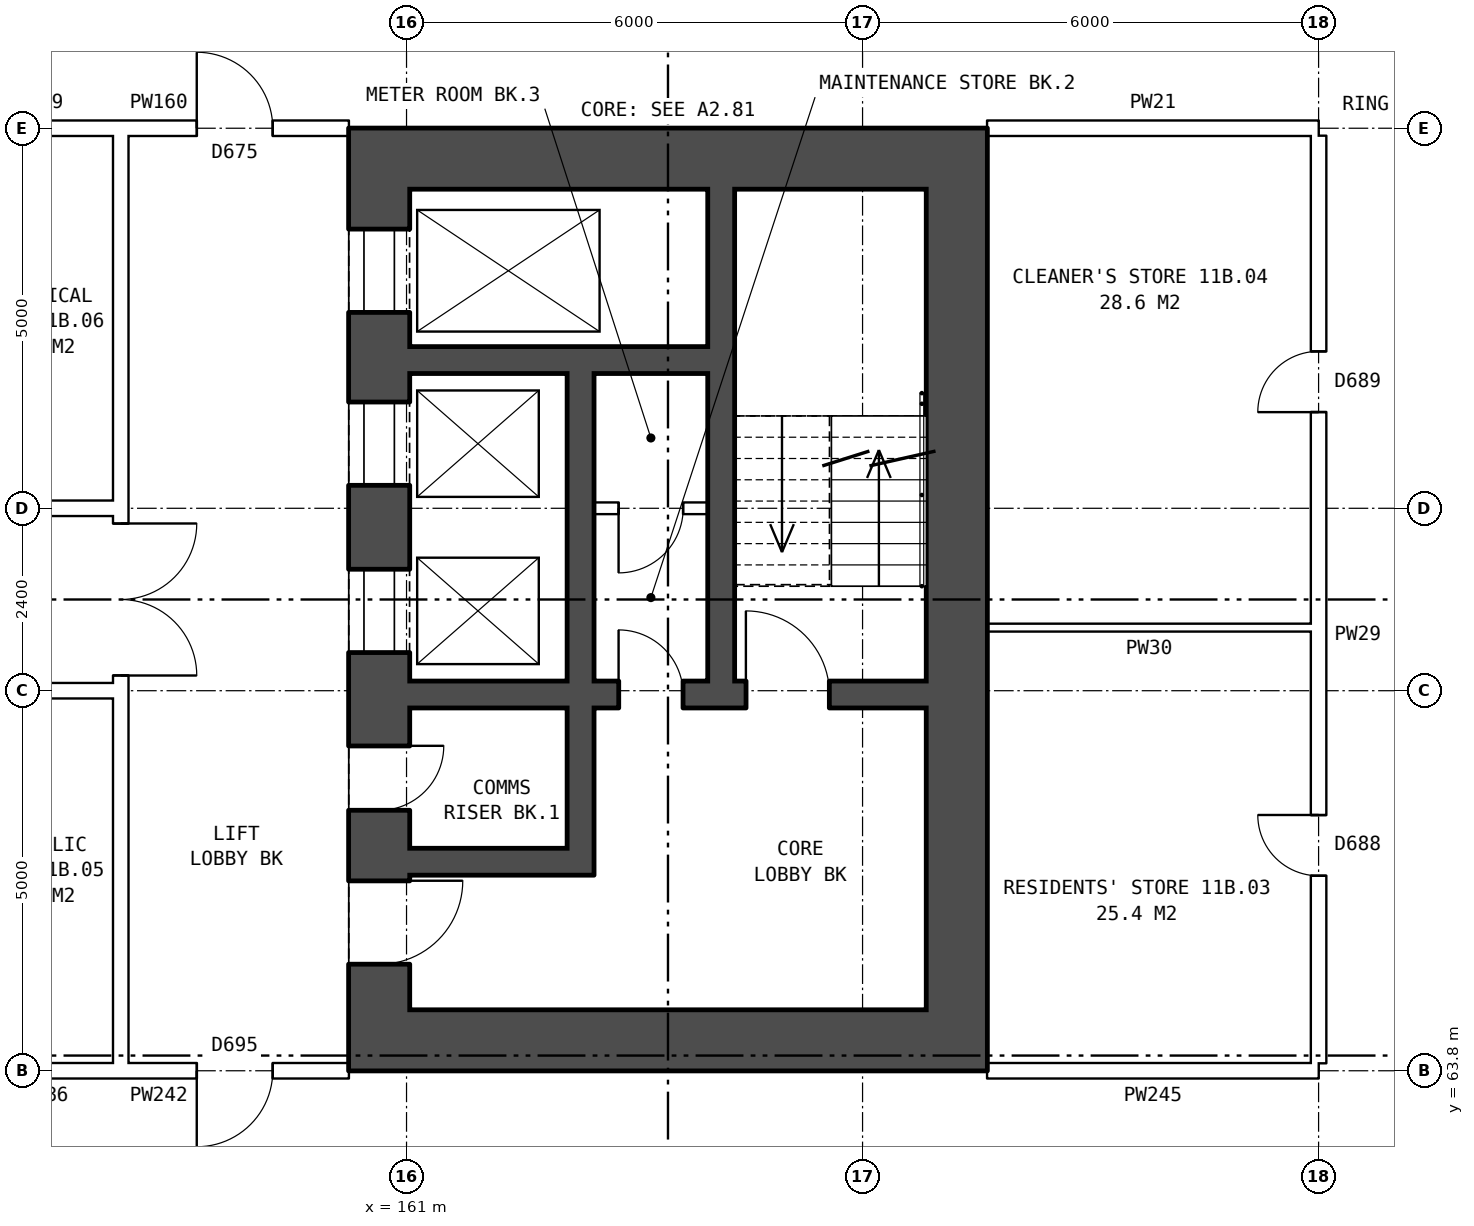
"""IFC4 building model, lengths in metres.
Left out: names, types, materials, properties, quantities, classifications, styles, units other than length and angle.
Written with IfcOpenShell. Run it as: python <this file> out.ifc"""

import sys

from ifc_helpers import new_model, si_unit, direction, frame, frame_2d, origin, place, context, subcontext, project, spatial, rectangle, extrude, element, fill, save


model = new_model("IFC4")
c1 = context("Model", 3, precision=1e-05, world=origin(), true_north=direction((0.0, 1.0)))
c2 = subcontext(c1, "Body", "Model", "MODEL_VIEW")
j1 = project(units=[si_unit("LENGTHUNIT", "METRE"), si_unit("PLANEANGLEUNIT", "RADIAN")], contexts=[c1])
p1 = place(None, origin())
s1 = spatial("IfcSite", under=j1, at=p1, CompositionType="ELEMENT")
p2 = place(p1, origin())
s2 = spatial("IfcBuilding", under=s1, at=p2, CompositionType="ELEMENT")
p3 = place(p2, frame((0.0, 0.0, 44.3)))
s3 = spatial("IfcBuildingStorey", under=s2, at=p3, CompositionType="ELEMENT", Elevation=44.3)
p4 = place(p3, frame((160.64, 75.4, 0.0), z_axis=(0.0, 0.0, 1.0), x_axis=(0.0, -1.0, 0.0)))
e1 = element("IfcWall", 1, at=p4, inside=s3, PredefinedType="SHEAR", context=c2, shape_type="SweptSolid", body=[
    extrude(rectangle(XDim=10.8, YDim=0.8, at=frame_2d((5.4, 0.0))), origin(), (0.0, 0.0, 1.0), 2.85),
])
p5 = place(p4, frame((0.525, 0.0, 0.0)))
e2 = element("IfcOpeningElement", 2, at=p5, cuts=e1, PredefinedType="OPENING", context=c2, shape_type="SweptSolid", body=[
    extrude(rectangle(XDim=1.1, YDim=2.1, at=frame_2d((0.55, 1.05))), frame((0.0, 0.41, 0.0), z_axis=(0.0, -1.0, 0.0), x_axis=(1.0, 0.0, 0.0)), (0.0, 0.0, 1.0), 0.82),
])
p6 = place(p4, frame((2.8, 0.0, 0.0)))
e3 = element("IfcOpeningElement", 3, at=p6, cuts=e1, PredefinedType="OPENING", context=c2, shape_type="SweptSolid", body=[
    extrude(rectangle(XDim=1.1, YDim=2.1, at=frame_2d((0.55, 1.05))), frame((0.0, 0.41, 0.0), z_axis=(0.0, -1.0, 0.0), x_axis=(1.0, 0.0, 0.0)), (0.0, 0.0, 1.0), 0.82),
])
p7 = place(p4, frame((5.0, 0.0, 0.0)))
e4 = element("IfcOpeningElement", 4, at=p7, cuts=e1, PredefinedType="OPENING", context=c2, shape_type="SweptSolid", body=[
    extrude(rectangle(XDim=1.1, YDim=2.1, at=frame_2d((0.55, 1.05))), frame((0.0, 0.41, 0.0), z_axis=(0.0, -1.0, 0.0), x_axis=(1.0, 0.0, 0.0)), (0.0, 0.0, 1.0), 0.82),
])
p8 = place(p4, frame((9.1, 0.0, 0.0)))
e5 = element("IfcOpeningElement", 5, at=p8, cuts=e1, PredefinedType="OPENING", context=c2, shape_type="SweptSolid", body=[
    extrude(rectangle(XDim=1.1, YDim=2.1, at=frame_2d((0.55, 1.05))), frame((0.0, 0.41, 0.0), z_axis=(0.0, -1.0, 0.0), x_axis=(1.0, 0.0, 0.0)), (0.0, 0.0, 1.0), 0.82),
])
p9 = place(p4, frame((7.325, 0.0, 0.0)))
e6 = element("IfcOpeningElement", 6, at=p9, cuts=e1, PredefinedType="OPENING", context=c2, shape_type="SweptSolid", body=[
    extrude(rectangle(XDim=0.85, YDim=2.1, at=frame_2d((0.425, 1.05))), frame((0.0, 0.41, 0.0), z_axis=(0.0, -1.0, 0.0), x_axis=(1.0, 0.0, 0.0)), (0.0, 0.0, 1.0), 0.82),
])
p10 = place(p3, frame((168.24, 75.4, 0.0), z_axis=(0.0, 0.0, 1.0), x_axis=(0.0, -1.0, 0.0)))
e7 = element("IfcWall", 7, at=p10, inside=s3, PredefinedType="SHEAR", context=c2, shape_type="SweptSolid", body=[
    extrude(rectangle(XDim=10.8, YDim=0.8, at=frame_2d((5.4, 0.0))), origin(), (0.0, 0.0, 1.0), 2.85),
])
for number, where, z_axis, x_axis in (
    (8, (160.24, 75.8, 0.0), (0.0, 0.0, 1.0), (1.0, 0.0, 0.0)),
    (9, (160.24, 64.2, 0.0), (0.0, 0.0, 1.0), (1.0, 0.0, 0.0)),
):
    element("IfcWall", number, at=place(p3, frame(where, z_axis=z_axis, x_axis=x_axis)), inside=s3, PredefinedType="SHEAR", context=c2, shape_type="SweptSolid", body=[
        extrude(rectangle(XDim=8.4, YDim=0.8, at=frame_2d((4.2, 0.0))), origin(), (0.0, 0.0, 1.0), 2.85),
    ])
p11 = place(p3, frame((161.04, 73.15, 0.0), z_axis=(0.0, 0.0, 1.0), x_axis=(1.0, 0.0, 0.0)))
e10 = element("IfcWall", 10, at=p11, inside=s3, PredefinedType="SHEAR", context=c2, shape_type="SweptSolid", body=[
    extrude(rectangle(XDim=3.925, YDim=0.35, at=frame_2d((1.962, 0.0))), origin(), (0.0, 0.0, 1.0), 2.85),
])
p12 = place(p3, frame((163.465, 71.2, 0.0), z_axis=(0.0, 0.0, 1.0), x_axis=(1.0, 0.0, 0.0)))
e11 = element("IfcWall", 11, at=p12, inside=s3, PredefinedType="PARTITIONING", context=c2, shape_type="SweptSolid", body=[
    extrude(rectangle(XDim=1.5, YDim=0.15, at=frame_2d((0.75, 0.0))), origin(), (0.0, 0.0, 1.0), 2.85),
])
p13 = place(p12, frame((0.325, 0.0, 0.0)))
e12 = element("IfcOpeningElement", 12, at=p13, cuts=e11, PredefinedType="OPENING", context=c2, shape_type="SweptSolid", body=[
    extrude(rectangle(XDim=0.85, YDim=2.1, at=frame_2d((0.425, 1.05))), frame((0.0, 0.085, 0.0), z_axis=(0.0, -1.0, 0.0), x_axis=(1.0, 0.0, 0.0)), (0.0, 0.0, 1.0), 0.17),
])
p14 = place(p3, frame((161.04, 68.75, 0.0), z_axis=(0.0, 0.0, 1.0), x_axis=(1.0, 0.0, 0.0)))
e13 = element("IfcWall", 13, at=p14, inside=s3, PredefinedType="SHEAR", context=c2, shape_type="SweptSolid", body=[
    extrude(rectangle(XDim=6.8, YDim=0.35, at=frame_2d((3.4, 0.0))), origin(), (0.0, 0.0, 1.0), 2.85),
])
p15 = place(p14, frame((4.425, 0.0, 0.0)))
e14 = element("IfcOpeningElement", 14, at=p15, cuts=e13, PredefinedType="OPENING", context=c2, shape_type="SweptSolid", body=[
    extrude(rectangle(XDim=1.1, YDim=2.1, at=frame_2d((0.55, 1.05))), frame((0.0, 0.185, 0.0), z_axis=(0.0, -1.0, 0.0), x_axis=(1.0, 0.0, 0.0)), (0.0, 0.0, 1.0), 0.37),
])
p16 = place(p14, frame((2.75, 0.0, 0.0)))
e15 = element("IfcOpeningElement", 15, at=p16, cuts=e13, PredefinedType="OPENING", context=c2, shape_type="SweptSolid", body=[
    extrude(rectangle(XDim=0.85, YDim=2.1, at=frame_2d((0.425, 1.05))), frame((0.0, 0.185, 0.0), z_axis=(0.0, -1.0, 0.0), x_axis=(1.0, 0.0, 0.0)), (0.0, 0.0, 1.0), 0.37),
])
p17 = place(p3, frame((161.04, 66.55, 0.0), z_axis=(0.0, 0.0, 1.0), x_axis=(1.0, 0.0, 0.0)))
e16 = element("IfcWall", 16, at=p17, inside=s3, PredefinedType="SHEAR", context=c2, shape_type="SweptSolid", body=[
    extrude(rectangle(XDim=2.075, YDim=0.35, at=frame_2d((1.038, 0.0))), origin(), (0.0, 0.0, 1.0), 2.85),
])
p18 = place(p3, frame((163.29, 72.975, 0.0), z_axis=(0.0, 0.0, 1.0), x_axis=(0.0, -1.0, 0.0)))
e17 = element("IfcWall", 17, at=p18, inside=s3, PredefinedType="SHEAR", context=c2, shape_type="SweptSolid", body=[
    extrude(rectangle(XDim=4.05, YDim=0.35, at=frame_2d((2.025, 0.0))), origin(), (0.0, 0.0, 1.0), 2.85),
])
p19 = place(p3, frame((163.29, 68.575, 0.0), z_axis=(0.0, 0.0, 1.0), x_axis=(0.0, -1.0, 0.0)))
e18 = element("IfcWall", 18, at=p19, inside=s3, PredefinedType="SHEAR", context=c2, shape_type="SweptSolid", body=[
    extrude(rectangle(XDim=2.2, YDim=0.35, at=frame_2d((1.1, 0.0))), origin(), (0.0, 0.0, 1.0), 2.85),
])
p20 = place(p3, frame((165.14, 75.4, 0.0), z_axis=(0.0, 0.0, 1.0), x_axis=(0.0, -1.0, 0.0)))
e19 = element("IfcWall", 19, at=p20, inside=s3, PredefinedType="SHEAR", context=c2, shape_type="SweptSolid", body=[
    extrude(rectangle(XDim=6.475, YDim=0.35, at=frame_2d((3.237, 0.0))), origin(), (0.0, 0.0, 1.0), 2.85),
])
p21 = place(p3, frame((157.24, 63.9, 0.0), z_axis=(0.0, 0.0, 1.0), x_axis=(0.0, 1.0, 0.0)))
e20 = element("IfcWall", 20, at=p21, inside=s3, PredefinedType="PARTITIONING", context=c2, shape_type="SweptSolid", body=[
    extrude(rectangle(XDim=12.2, YDim=0.2, at=frame_2d((6.1, 0.0))), origin(), (0.0, 0.0, 1.0), 2.85),
])
p22 = place(p21, frame((5.1, 0.0, 0.0)))
e21 = element("IfcOpeningElement", 21, at=p22, cuts=e20, PredefinedType="OPENING", context=c2, shape_type="SweptSolid", body=[
    extrude(rectangle(XDim=2.0, YDim=2.1, at=frame_2d((1.0, 1.05))), frame((0.0, 0.11, 0.0), z_axis=(0.0, -1.0, 0.0), x_axis=(1.0, 0.0, 0.0)), (0.0, 0.0, 1.0), 0.22),
])
p23 = place(p3, frame((155.1, 63.8, 0.0), z_axis=(0.0, 0.0, 1.0), x_axis=(1.0, 0.0, 0.0)))
e22 = element("IfcWall", 22, at=p23, inside=s3, PredefinedType="PARTITIONING", context=c2, shape_type="SweptSolid", body=[
    extrude(rectangle(XDim=2.14, YDim=0.2, at=frame_2d((1.07, 0.0))), origin(), (0.0, 0.0, 1.0), 2.85),
])
p24 = place(p3, frame((157.24, 63.8, 0.0), z_axis=(0.0, 0.0, 1.0), x_axis=(1.0, 0.0, 0.0)))
e23 = element("IfcWall", 23, at=p24, inside=s3, PredefinedType="PARTITIONING", context=c2, shape_type="SweptSolid", body=[
    extrude(rectangle(XDim=3.0, YDim=0.2, at=frame_2d((1.5, 0.0))), origin(), (0.0, 0.0, 1.0), 2.85),
])
p25 = place(p24, frame((1.0, 0.0, 0.0)))
e24 = element("IfcOpeningElement", 24, at=p25, cuts=e23, PredefinedType="OPENING", context=c2, shape_type="SweptSolid", body=[
    extrude(rectangle(XDim=1.0, YDim=2.1, at=frame_2d((0.5, 1.05))), frame((0.0, 0.11, 0.0), z_axis=(0.0, -1.0, 0.0), x_axis=(1.0, 0.0, 0.0)), (0.0, 0.0, 1.0), 0.22),
])
p26 = place(p3, frame((168.64, 63.8, 0.0), z_axis=(0.0, 0.0, 1.0), x_axis=(1.0, 0.0, 0.0)))
e25 = element("IfcWall", 25, at=p26, inside=s3, PredefinedType="PARTITIONING", context=c2, shape_type="SweptSolid", body=[
    extrude(rectangle(XDim=4.36, YDim=0.2, at=frame_2d((2.18, 0.0))), origin(), (0.0, 0.0, 1.0), 2.85),
])
p27 = place(p3, frame((142.76, 68.8, 0.0), z_axis=(0.0, 0.0, 1.0), x_axis=(1.0, 0.0, 0.0)))
e26 = element("IfcWall", 26, at=p27, inside=s3, PredefinedType="PARTITIONING", context=c2, shape_type="SweptSolid", body=[
    extrude(rectangle(XDim=14.48, YDim=0.2, at=frame_2d((7.24, 0.0))), origin(), (0.0, 0.0, 1.0), 2.85),
])
p28 = place(p27, frame((4.24, 0.0, 0.0)))
e27 = element("IfcOpeningElement", 27, at=p28, cuts=e26, PredefinedType="OPENING", context=c2, shape_type="SweptSolid", body=[
    extrude(rectangle(XDim=1.0, YDim=2.1, at=frame_2d((0.5, 1.05))), frame((0.0, 0.11, 0.0), z_axis=(0.0, -1.0, 0.0), x_axis=(1.0, 0.0, 0.0)), (0.0, 0.0, 1.0), 0.22),
])
p29 = place(p27, frame((10.24, 0.0, 0.0)))
e28 = element("IfcOpeningElement", 28, at=p29, cuts=e26, PredefinedType="OPENING", context=c2, shape_type="SweptSolid", body=[
    extrude(rectangle(XDim=1.0, YDim=2.1, at=frame_2d((0.5, 1.05))), frame((0.0, 0.11, 0.0), z_axis=(0.0, -1.0, 0.0), x_axis=(1.0, 0.0, 0.0)), (0.0, 0.0, 1.0), 0.22),
])
p30 = place(p3, frame((168.64, 69.63, 0.0), z_axis=(0.0, 0.0, 1.0), x_axis=(1.0, 0.0, 0.0)))
e29 = element("IfcWall", 29, at=p30, inside=s3, PredefinedType="PARTITIONING", context=c2, shape_type="SweptSolid", body=[
    extrude(rectangle(XDim=4.26, YDim=0.1, at=frame_2d((2.13, 0.0))), origin(), (0.0, 0.0, 1.0), 2.85),
])
p31 = place(p3, frame((142.76, 71.2, 0.0), z_axis=(0.0, 0.0, 1.0), x_axis=(1.0, 0.0, 0.0)))
e30 = element("IfcWall", 30, at=p31, inside=s3, PredefinedType="PARTITIONING", context=c2, shape_type="SweptSolid", body=[
    extrude(rectangle(XDim=14.48, YDim=0.2, at=frame_2d((7.24, 0.0))), origin(), (0.0, 0.0, 1.0), 2.85),
])
p32 = place(p31, frame((1.12, 0.0, 0.0)))
e31 = element("IfcOpeningElement", 31, at=p32, cuts=e30, PredefinedType="OPENING", context=c2, shape_type="SweptSolid", body=[
    extrude(rectangle(XDim=1.0, YDim=2.1, at=frame_2d((0.5, 1.05))), frame((0.0, 0.11, 0.0), z_axis=(0.0, -1.0, 0.0), x_axis=(1.0, 0.0, 0.0)), (0.0, 0.0, 1.0), 0.22),
])
p33 = place(p31, frame((7.24, 0.0, 0.0)))
e32 = element("IfcOpeningElement", 32, at=p33, cuts=e30, PredefinedType="OPENING", context=c2, shape_type="SweptSolid", body=[
    extrude(rectangle(XDim=1.0, YDim=2.1, at=frame_2d((0.5, 1.05))), frame((0.0, 0.11, 0.0), z_axis=(0.0, -1.0, 0.0), x_axis=(1.0, 0.0, 0.0)), (0.0, 0.0, 1.0), 0.22),
])
p34 = place(p3, frame((155.1, 76.2, 0.0), z_axis=(0.0, 0.0, 1.0), x_axis=(1.0, 0.0, 0.0)))
e33 = element("IfcWall", 33, at=p34, inside=s3, PredefinedType="PARTITIONING", context=c2, shape_type="SweptSolid", body=[
    extrude(rectangle(XDim=2.14, YDim=0.2, at=frame_2d((1.07, 0.0))), origin(), (0.0, 0.0, 1.0), 2.85),
])
p35 = place(p3, frame((157.24, 76.2, 0.0), z_axis=(0.0, 0.0, 1.0), x_axis=(1.0, 0.0, 0.0)))
e34 = element("IfcWall", 34, at=p35, inside=s3, PredefinedType="PARTITIONING", context=c2, shape_type="SweptSolid", body=[
    extrude(rectangle(XDim=3.0, YDim=0.2, at=frame_2d((1.5, 0.0))), origin(), (0.0, 0.0, 1.0), 2.85),
])
p36 = place(p35, frame((1.0, 0.0, 0.0)))
e35 = element("IfcOpeningElement", 35, at=p36, cuts=e34, PredefinedType="OPENING", context=c2, shape_type="SweptSolid", body=[
    extrude(rectangle(XDim=1.0, YDim=2.1, at=frame_2d((0.5, 1.05))), frame((0.0, 0.11, 0.0), z_axis=(0.0, -1.0, 0.0), x_axis=(1.0, 0.0, 0.0)), (0.0, 0.0, 1.0), 0.22),
])
p37 = place(p3, frame((168.64, 76.2, 0.0), z_axis=(0.0, 0.0, 1.0), x_axis=(1.0, 0.0, 0.0)))
e36 = element("IfcWall", 36, at=p37, inside=s3, PredefinedType="PARTITIONING", context=c2, shape_type="SweptSolid", body=[
    extrude(rectangle(XDim=4.36, YDim=0.2, at=frame_2d((2.18, 0.0))), origin(), (0.0, 0.0, 1.0), 2.85),
])
p38 = place(p3, frame((173.0, 63.9, 0.0), z_axis=(0.0, 0.0, 1.0), x_axis=(0.0, 1.0, 0.0)))
e37 = element("IfcWall", 37, at=p38, inside=s3, PredefinedType="PARTITIONING", context=c2, shape_type="SweptSolid", body=[
    extrude(rectangle(XDim=12.2, YDim=0.2, at=frame_2d((6.1, 0.0))), origin(), (0.0, 0.0, 1.0), 2.85),
])
p39 = place(p38, frame((2.465, 0.0, 0.0)))
e38 = element("IfcOpeningElement", 38, at=p39, cuts=e37, PredefinedType="OPENING", context=c2, shape_type="SweptSolid", body=[
    extrude(rectangle(XDim=0.8, YDim=2.1, at=frame_2d((0.4, 1.05))), frame((0.0, 0.11, 0.0), z_axis=(0.0, -1.0, 0.0), x_axis=(1.0, 0.0, 0.0)), (0.0, 0.0, 1.0), 0.22),
])
p40 = place(p38, frame((8.565, 0.0, 0.0)))
e39 = element("IfcOpeningElement", 39, at=p40, cuts=e37, PredefinedType="OPENING", context=c2, shape_type="SweptSolid", body=[
    extrude(rectangle(XDim=0.8, YDim=2.1, at=frame_2d((0.4, 1.05))), frame((0.0, 0.11, 0.0), z_axis=(0.0, -1.0, 0.0), x_axis=(1.0, 0.0, 0.0)), (0.0, 0.0, 1.0), 0.22),
])
p41 = place(p5, origin())
e40 = element("IfcDoor", 40, at=p41, inside=s3, OperationType="DOUBLE_DOOR_SLIDING", PredefinedType="DOOR", context=c2, shape_type="SweptSolid", body=[
    extrude(rectangle(XDim=1.1, YDim=2.1, at=frame_2d((0.55, 1.05))), frame((0.0, 0.385, 0.0), z_axis=(0.0, -1.0, 0.0), x_axis=(1.0, 0.0, 0.0)), (0.0, 0.0, 1.0), 0.05),
])
fill(e2, e40)
p42 = place(p6, origin())
e41 = element("IfcDoor", 41, at=p42, inside=s3, OperationType="DOUBLE_DOOR_SLIDING", PredefinedType="DOOR", context=c2, shape_type="SweptSolid", body=[
    extrude(rectangle(XDim=1.1, YDim=2.1, at=frame_2d((0.55, 1.05))), frame((0.0, 0.385, 0.0), z_axis=(0.0, -1.0, 0.0), x_axis=(1.0, 0.0, 0.0)), (0.0, 0.0, 1.0), 0.05),
])
fill(e3, e41)
p43 = place(p7, origin())
e42 = element("IfcDoor", 42, at=p43, inside=s3, OperationType="DOUBLE_DOOR_SLIDING", PredefinedType="DOOR", context=c2, shape_type="SweptSolid", body=[
    extrude(rectangle(XDim=1.1, YDim=2.1, at=frame_2d((0.55, 1.05))), frame((0.0, 0.385, 0.0), z_axis=(0.0, -1.0, 0.0), x_axis=(1.0, 0.0, 0.0)), (0.0, 0.0, 1.0), 0.05),
])
fill(e4, e42)
p44 = place(p8, origin())
e43 = element("IfcDoor", 43, at=p44, inside=s3, OperationType="SINGLE_SWING_LEFT", PredefinedType="DOOR", context=c2, shape_type="SweptSolid", body=[
    extrude(rectangle(XDim=1.1, YDim=2.1, at=frame_2d((0.55, 1.05))), frame((0.0, 0.385, 0.0), z_axis=(0.0, -1.0, 0.0), x_axis=(1.0, 0.0, 0.0)), (0.0, 0.0, 1.0), 0.05),
])
fill(e5, e43)
p45 = place(p15, origin())
e44 = element("IfcDoor", 44, at=p45, inside=s3, OperationType="SINGLE_SWING_LEFT", PredefinedType="DOOR", context=c2, shape_type="SweptSolid", body=[
    extrude(rectangle(XDim=1.1, YDim=2.1, at=frame_2d((0.55, 1.05))), frame((0.0, 0.025, 0.0), z_axis=(0.0, -1.0, 0.0), x_axis=(1.0, 0.0, 0.0)), (0.0, 0.0, 1.0), 0.05),
])
fill(e14, e44)
p46 = place(p9, origin())
e45 = element("IfcDoor", 45, at=p46, inside=s3, OperationType="SINGLE_SWING_LEFT", PredefinedType="DOOR", context=c2, shape_type="SweptSolid", body=[
    extrude(rectangle(XDim=0.85, YDim=2.1, at=frame_2d((0.425, 1.05))), frame((0.0, 0.385, 0.0), z_axis=(0.0, -1.0, 0.0), x_axis=(1.0, 0.0, 0.0)), (0.0, 0.0, 1.0), 0.05),
])
fill(e6, e45)
p47 = place(p16, origin())
e46 = element("IfcDoor", 46, at=p47, inside=s3, OperationType="SINGLE_SWING_LEFT", PredefinedType="DOOR", context=c2, shape_type="SweptSolid", body=[
    extrude(rectangle(XDim=0.85, YDim=2.1, at=frame_2d((0.425, 1.05))), frame((0.0, 0.025, 0.0), z_axis=(0.0, -1.0, 0.0), x_axis=(1.0, 0.0, 0.0)), (0.0, 0.0, 1.0), 0.05),
])
fill(e15, e46)
p48 = place(p13, frame((0.85, 0.0, 0.0), z_axis=(0.0, 0.0, 1.0), x_axis=(-1.0, 0.0, 0.0)))
e47 = element("IfcDoor", 47, at=p48, inside=s3, OperationType="SINGLE_SWING_RIGHT", PredefinedType="DOOR", context=c2, shape_type="SweptSolid", body=[
    extrude(rectangle(XDim=0.85, YDim=2.1, at=frame_2d((0.425, 1.05))), frame((0.0, 0.025, 0.0), z_axis=(0.0, -1.0, 0.0), x_axis=(1.0, 0.0, 0.0)), (0.0, 0.0, 1.0), 0.05),
])
fill(e12, e47)
p49 = place(p22, frame((2.0, 0.0, 0.0), z_axis=(0.0, 0.0, 1.0), x_axis=(-1.0, 0.0, 0.0)))
e48 = element("IfcDoor", 48, at=p49, inside=s3, OperationType="DOUBLE_DOOR_SINGLE_SWING", PredefinedType="DOOR", context=c2, shape_type="SweptSolid", body=[
    extrude(rectangle(XDim=2.0, YDim=2.1, at=frame_2d((1.0, 1.05))), frame((0.0, 0.025, 0.0), z_axis=(0.0, -1.0, 0.0), x_axis=(1.0, 0.0, 0.0)), (0.0, 0.0, 1.0), 0.05),
])
fill(e21, e48)
p50 = place(p25, frame((1.0, 0.0, 0.0), z_axis=(0.0, 0.0, 1.0), x_axis=(-1.0, 0.0, 0.0)))
e49 = element("IfcDoor", 49, at=p50, inside=s3, OperationType="SINGLE_SWING_RIGHT", PredefinedType="DOOR", context=c2, shape_type="SweptSolid", body=[
    extrude(rectangle(XDim=1.0, YDim=2.1, at=frame_2d((0.5, 1.05))), frame((0.0, 0.025, 0.0), z_axis=(0.0, -1.0, 0.0), x_axis=(1.0, 0.0, 0.0)), (0.0, 0.0, 1.0), 0.05),
])
fill(e24, e49)
p51 = place(p36, origin())
e50 = element("IfcDoor", 50, at=p51, inside=s3, OperationType="SINGLE_SWING_LEFT", PredefinedType="DOOR", context=c2, shape_type="SweptSolid", body=[
    extrude(rectangle(XDim=1.0, YDim=2.1, at=frame_2d((0.5, 1.05))), frame((0.0, 0.025, 0.0), z_axis=(0.0, -1.0, 0.0), x_axis=(1.0, 0.0, 0.0)), (0.0, 0.0, 1.0), 0.05),
])
fill(e35, e50)
p52 = place(p39, origin())
e51 = element("IfcDoor", 51, at=p52, inside=s3, OperationType="SINGLE_SWING_RIGHT", PredefinedType="DOOR", context=c2, shape_type="SweptSolid", body=[
    extrude(rectangle(XDim=0.8, YDim=2.1, at=frame_2d((0.4, 1.05))), frame((0.0, 0.025, 0.0), z_axis=(0.0, -1.0, 0.0), x_axis=(1.0, 0.0, 0.0)), (0.0, 0.0, 1.0), 0.05),
])
fill(e38, e51)
p53 = place(p40, origin())
e52 = element("IfcDoor", 52, at=p53, inside=s3, OperationType="SINGLE_SWING_LEFT", PredefinedType="DOOR", context=c2, shape_type="SweptSolid", body=[
    extrude(rectangle(XDim=0.8, YDim=2.1, at=frame_2d((0.4, 1.05))), frame((0.0, 0.025, 0.0), z_axis=(0.0, -1.0, 0.0), x_axis=(1.0, 0.0, 0.0)), (0.0, 0.0, 1.0), 0.05),
])
fill(e39, e52)
save(model, sys.argv[1])
